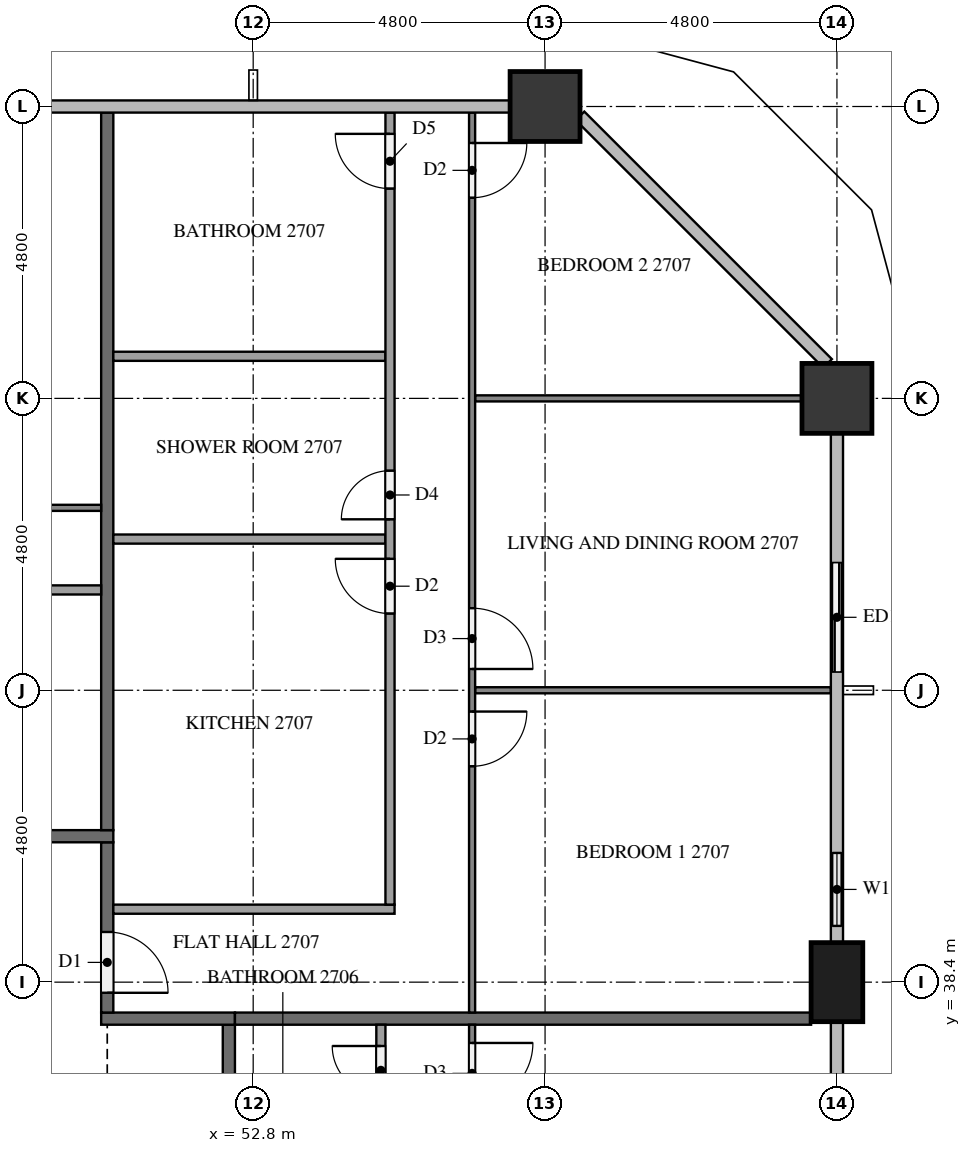
"""IFC4 building model, lengths in metres.
Left out: names, types, materials, properties, quantities, classifications, styles, units other than length and angle.
Written with IfcOpenShell. Run it as: python <this file> out.ifc"""

import sys

from ifc_helpers import new_model, si_unit, direction, frame, frame_2d, origin, origin_2d, place, context, subcontext, project, spatial, rectangle, extrude, element, fill, save


model = new_model("IFC4")
c1 = context("Model", 3, precision=1e-05, world=origin(), true_north=direction((0.0, 1.0)))
c2 = subcontext(c1, "Body", "Model", "MODEL_VIEW")
j1 = project(units=[si_unit("LENGTHUNIT", "METRE"), si_unit("PLANEANGLEUNIT", "RADIAN")], contexts=[c1])
p1 = place(None, origin())
s1 = spatial("IfcSite", under=j1, at=p1, CompositionType="ELEMENT")
p2 = place(p1, origin())
s2 = spatial("IfcBuilding", under=s1, at=p2, CompositionType="ELEMENT")
p3 = place(p2, frame((0.0, 0.0, 106.7)))
s3 = spatial("IfcBuildingStorey", under=s2, at=p3, CompositionType="ELEMENT", Elevation=106.7)
p4 = place(p3, frame((62.4, 38.4, 0.0), z_axis=(0.0, 0.0, 1.0), x_axis=(0.0, 1.0, 0.0)))
e1 = element("IfcColumn", 1, at=p4, inside=s3, PredefinedType="COLUMN", context=c2, shape_type="SweptSolid", body=[
    extrude(rectangle(XDim=1.3, YDim=0.85, at=origin_2d()), origin(), (0.0, 0.0, 1.0), 3.2),
])
for number, where, z_axis, x_axis in (
    (2, (62.4, 48.0, 0.0), (0.0, 0.0, 1.0), (1.0, 0.0, 0.0)),
    (3, (57.6, 52.8, 0.0), (0.0, 0.0, 1.0), (1.0, 0.0, 0.0)),
):
    element("IfcColumn", number, at=place(p3, frame(where, z_axis=z_axis, x_axis=x_axis)), inside=s3, PredefinedType="COLUMN", context=c2, shape_type="SweptSolid", body=[
        extrude(rectangle(XDim=1.15, YDim=1.15, at=origin_2d()), origin(), (0.0, 0.0, 1.0), 3.2),
    ])
p5 = place(p3, frame((62.4, 39.05, 0.0), z_axis=(0.0, 0.0, 1.0), x_axis=(0.0, 1.0, 0.0)))
e4 = element("IfcWall", 4, at=p5, inside=s3, PredefinedType="SOLIDWALL", context=c2, shape_type="SweptSolid", body=[
    extrude(rectangle(XDim=1.75, YDim=0.15, at=frame_2d((0.875, 0.0))), origin(), (0.0, 0.0, 1.0), 3.2),
])
p6 = place(p5, frame((0.275, 0.0, 0.9)))
e5 = element("IfcOpeningElement", 5, at=p6, cuts=e4, PredefinedType="OPENING", context=c2, shape_type="SweptSolid", body=[
    extrude(rectangle(XDim=1.2, YDim=1.4, at=frame_2d((0.6, 0.7))), frame((0.0, 0.085, 0.0), z_axis=(0.0, -1.0, 0.0), x_axis=(1.0, 0.0, 0.0)), (0.0, 0.0, 1.0), 0.17),
])
p7 = place(p3, frame((62.4, 43.2, 0.0), z_axis=(0.0, 0.0, 1.0), x_axis=(0.0, 1.0, 0.0)))
e6 = element("IfcWall", 6, at=p7, inside=s3, PredefinedType="SOLIDWALL", context=c2, shape_type="SweptSolid", body=[
    extrude(rectangle(XDim=2.4, YDim=0.15, at=frame_2d((1.2, 0.0))), origin(), (0.0, 0.0, 1.0), 3.2),
])
p8 = place(p7, frame((0.3, 0.0, 0.0)))
e7 = element("IfcOpeningElement", 7, at=p8, cuts=e6, PredefinedType="OPENING", context=c2, shape_type="SweptSolid", body=[
    extrude(rectangle(XDim=1.8, YDim=2.4, at=frame_2d((0.9, 1.2))), frame((0.0, 0.085, 0.0), z_axis=(0.0, -1.0, 0.0), x_axis=(1.0, 0.0, 0.0)), (0.0, 0.0, 1.0), 0.17),
])
p9 = place(p3, frame((52.4, 37.7, 0.0), z_axis=(0.0, 0.0, 1.0), x_axis=(0.0, -1.0, 0.0)))
e8 = element("IfcWall", 8, at=p9, inside=s3, PredefinedType="PARTITIONING", context=c2, shape_type="SweptSolid", body=[
    extrude(rectangle(XDim=22.6, YDim=0.2, at=frame_2d((11.3, 0.0))), origin(), (0.0, 0.0, 1.0), 3.2),
])
p10 = place(p9, frame((6.925, 0.0, 0.0)))
e9 = element("IfcOpeningElement", 9, at=p10, cuts=e8, PredefinedType="OPENING", context=c2, shape_type="SweptSolid", body=[
    extrude(rectangle(XDim=1.0, YDim=2.1, at=frame_2d((0.5, 1.05))), frame((0.0, 0.11, 0.0), z_axis=(0.0, -1.0, 0.0), x_axis=(1.0, 0.0, 0.0)), (0.0, 0.0, 1.0), 0.22),
])
p11 = place(p9, frame((5.075, 0.0, 0.0)))
e10 = element("IfcOpeningElement", 10, at=p11, cuts=e8, PredefinedType="OPENING", context=c2, shape_type="SweptSolid", body=[
    extrude(rectangle(XDim=1.0, YDim=2.1, at=frame_2d((0.5, 1.05))), frame((0.0, 0.11, 0.0), z_axis=(0.0, -1.0, 0.0), x_axis=(1.0, 0.0, 0.0)), (0.0, 0.0, 1.0), 0.22),
])
p12 = place(p3, frame((52.5, 37.8, 0.0), z_axis=(0.0, 0.0, 1.0), x_axis=(-1.0, 0.0, 0.0)))
e11 = element("IfcWall", 11, at=p12, inside=s3, PredefinedType="PARTITIONING", context=c2, shape_type="SweptSolid", body=[
    extrude(rectangle(XDim=2.2, YDim=0.2, at=frame_2d((1.1, 0.0))), origin(), (0.0, 0.0, 1.0), 3.2),
])
p13 = place(p3, frame((50.4, 40.7, 0.0), z_axis=(0.0, 0.0, 1.0), x_axis=(0.0, -1.0, 0.0)))
e12 = element("IfcWall", 12, at=p13, inside=s3, PredefinedType="PARTITIONING", context=c2, shape_type="SweptSolid", body=[
    extrude(rectangle(XDim=2.8, YDim=0.2, at=frame_2d((1.4, 0.0))), origin(), (0.0, 0.0, 1.0), 3.2),
])
p14 = place(p13, frame((1.475, 0.0, 0.0)))
e13 = element("IfcOpeningElement", 13, at=p14, cuts=e12, PredefinedType="OPENING", context=c2, shape_type="SweptSolid", body=[
    extrude(rectangle(XDim=1.0, YDim=2.1, at=frame_2d((0.5, 1.05))), frame((0.0, 0.11, 0.0), z_axis=(0.0, -1.0, 0.0), x_axis=(1.0, 0.0, 0.0)), (0.0, 0.0, 1.0), 0.22),
])
p15 = place(p3, frame((11.9, 40.8, 0.0), z_axis=(0.0, 0.0, 1.0), x_axis=(1.0, 0.0, 0.0)))
e14 = element("IfcWall", 14, at=p15, inside=s3, PredefinedType="PARTITIONING", context=c2, shape_type="SweptSolid", body=[
    extrude(rectangle(XDim=38.6, YDim=0.2, at=frame_2d((19.3, 0.0))), origin(), (0.0, 0.0, 1.0), 3.2),
])
p16 = place(p15, frame((22.125, 0.0, 0.0)))
e15 = element("IfcOpeningElement", 15, at=p16, cuts=e14, PredefinedType="OPENING", context=c2, shape_type="SweptSolid", body=[
    extrude(rectangle(XDim=1.0, YDim=2.1, at=frame_2d((0.5, 1.05))), frame((0.0, 0.11, 0.0), z_axis=(0.0, -1.0, 0.0), x_axis=(1.0, 0.0, 0.0)), (0.0, 0.0, 1.0), 0.22),
])
p17 = place(p15, frame((20.275, 0.0, 0.0)))
e16 = element("IfcOpeningElement", 16, at=p17, cuts=e14, PredefinedType="OPENING", context=c2, shape_type="SweptSolid", body=[
    extrude(rectangle(XDim=1.0, YDim=2.1, at=frame_2d((0.5, 1.05))), frame((0.0, 0.11, 0.0), z_axis=(0.0, -1.0, 0.0), x_axis=(1.0, 0.0, 0.0)), (0.0, 0.0, 1.0), 0.22),
])
p18 = place(p15, frame((0.525, 0.0, 0.0)))
e17 = element("IfcOpeningElement", 17, at=p18, cuts=e14, PredefinedType="OPENING", context=c2, shape_type="SweptSolid", body=[
    extrude(rectangle(XDim=1.0, YDim=2.1, at=frame_2d((0.5, 1.05))), frame((0.0, 0.11, 0.0), z_axis=(0.0, -1.0, 0.0), x_axis=(1.0, 0.0, 0.0)), (0.0, 0.0, 1.0), 0.22),
])
p19 = place(p3, frame((52.5, 37.8, 0.0), z_axis=(0.0, 0.0, 1.0), x_axis=(1.0, 0.0, 0.0)))
e18 = element("IfcWall", 18, at=p19, inside=s3, PredefinedType="PARTITIONING", context=c2, shape_type="SweptSolid", body=[
    extrude(rectangle(XDim=9.475, YDim=0.2, at=frame_2d((4.738, 0.0))), origin(), (0.0, 0.0, 1.0), 3.2),
])
p20 = place(p3, frame((50.4, 40.9, 0.0), z_axis=(0.0, 0.0, 1.0), x_axis=(0.0, 1.0, 0.0)))
e19 = element("IfcWall", 19, at=p20, inside=s3, PredefinedType="PARTITIONING", context=c2, shape_type="SweptSolid", body=[
    extrude(rectangle(XDim=11.8, YDim=0.2, at=frame_2d((5.9, 0.0))), origin(), (0.0, 0.0, 1.0), 3.2),
])
p21 = place(p3, frame((56.4, 37.7, 0.0), z_axis=(0.0, 0.0, 1.0), x_axis=(0.0, -1.0, 0.0)))
e20 = element("IfcWall", 20, at=p21, inside=s3, PredefinedType="PARTITIONING", context=c2, shape_type="SweptSolid", body=[
    extrude(rectangle(XDim=6.4, YDim=0.1, at=frame_2d((3.2, 0.0))), origin(), (0.0, 0.0, 1.0), 3.2),
])
p22 = place(p21, frame((0.3, 0.0, 0.0)))
e21 = element("IfcOpeningElement", 21, at=p22, cuts=e20, PredefinedType="OPENING", context=c2, shape_type="SweptSolid", body=[
    extrude(rectangle(XDim=1.0, YDim=2.1, at=frame_2d((0.5, 1.05))), frame((0.0, 0.06, 0.0), z_axis=(0.0, -1.0, 0.0), x_axis=(1.0, 0.0, 0.0)), (0.0, 0.0, 1.0), 0.12),
])
p23 = place(p3, frame((54.9, 33.075, 0.0), z_axis=(0.0, 0.0, 1.0), x_axis=(0.0, 1.0, 0.0)))
e22 = element("IfcWall", 22, at=p23, inside=s3, PredefinedType="PARTITIONING", context=c2, shape_type="SweptSolid", body=[
    extrude(rectangle(XDim=4.625, YDim=0.15, at=frame_2d((2.312, 0.0))), origin(), (0.0, 0.0, 1.0), 3.2),
])
p24 = place(p23, frame((0.3, 0.0, 0.0)))
e23 = element("IfcOpeningElement", 23, at=p24, cuts=e22, PredefinedType="OPENING", context=c2, shape_type="SweptSolid", body=[
    extrude(rectangle(XDim=0.9, YDim=2.1, at=frame_2d((0.45, 1.05))), frame((0.0, 0.085, 0.0), z_axis=(0.0, -1.0, 0.0), x_axis=(1.0, 0.0, 0.0)), (0.0, 0.0, 1.0), 0.17),
])
p25 = place(p23, frame((3.475, 0.0, 0.0)))
e24 = element("IfcOpeningElement", 24, at=p25, cuts=e22, PredefinedType="OPENING", context=c2, shape_type="SweptSolid", body=[
    extrude(rectangle(XDim=0.8, YDim=2.1, at=frame_2d((0.4, 1.05))), frame((0.0, 0.085, 0.0), z_axis=(0.0, -1.0, 0.0), x_axis=(1.0, 0.0, 0.0)), (0.0, 0.0, 1.0), 0.17),
])
p26 = place(p3, frame((56.45, 43.2, 0.0), z_axis=(0.0, 0.0, 1.0), x_axis=(1.0, 0.0, 0.0)))
e25 = element("IfcWall", 25, at=p26, inside=s3, PredefinedType="PARTITIONING", context=c2, shape_type="SweptSolid", body=[
    extrude(rectangle(XDim=5.85, YDim=0.1, at=frame_2d((2.925, 0.0))), origin(), (0.0, 0.0, 1.0), 3.2),
])
p27 = place(p3, frame((56.45, 48.0, 0.0), z_axis=(0.0, 0.0, 1.0), x_axis=(1.0, 0.0, 0.0)))
e26 = element("IfcWall", 26, at=p27, inside=s3, PredefinedType="PARTITIONING", context=c2, shape_type="SweptSolid", body=[
    extrude(rectangle(XDim=5.375, YDim=0.1, at=frame_2d((2.688, 0.0))), origin(), (0.0, 0.0, 1.0), 3.2),
])
p28 = place(p3, frame((56.4, 52.7, 0.0), z_axis=(0.0, 0.0, 1.0), x_axis=(0.0, -1.0, 0.0)))
e27 = element("IfcWall", 27, at=p28, inside=s3, PredefinedType="PARTITIONING", context=c2, shape_type="SweptSolid", body=[
    extrude(rectangle(XDim=14.8, YDim=0.1, at=frame_2d((7.4, 0.0))), origin(), (0.0, 0.0, 1.0), 3.2),
])
p29 = place(p28, frame((9.85, 0.0, 0.0)))
e28 = element("IfcOpeningElement", 28, at=p29, cuts=e27, PredefinedType="OPENING", context=c2, shape_type="SweptSolid", body=[
    extrude(rectangle(XDim=0.9, YDim=2.1, at=frame_2d((0.45, 1.05))), frame((0.0, 0.06, 0.0), z_axis=(0.0, -1.0, 0.0), x_axis=(1.0, 0.0, 0.0)), (0.0, 0.0, 1.0), 0.12),
])
p30 = place(p28, frame((8.15, 0.0, 0.0)))
e29 = element("IfcOpeningElement", 29, at=p30, cuts=e27, PredefinedType="OPENING", context=c2, shape_type="SweptSolid", body=[
    extrude(rectangle(XDim=1.0, YDim=2.1, at=frame_2d((0.5, 1.05))), frame((0.0, 0.06, 0.0), z_axis=(0.0, -1.0, 0.0), x_axis=(1.0, 0.0, 0.0)), (0.0, 0.0, 1.0), 0.12),
])
p31 = place(p28, frame((0.5, 0.0, 0.0)))
e30 = element("IfcOpeningElement", 30, at=p31, cuts=e27, PredefinedType="OPENING", context=c2, shape_type="SweptSolid", body=[
    extrude(rectangle(XDim=0.9, YDim=2.1, at=frame_2d((0.45, 1.05))), frame((0.0, 0.06, 0.0), z_axis=(0.0, -1.0, 0.0), x_axis=(1.0, 0.0, 0.0)), (0.0, 0.0, 1.0), 0.12),
])
for number, where, z_axis, x_axis in (
    (31, (50.5, 45.687, 0.0), (0.0, 0.0, 1.0), (1.0, 0.0, 0.0)),
    (32, (50.5, 48.692, 0.0), (0.0, 0.0, 1.0), (1.0, 0.0, 0.0)),
):
    element("IfcWall", number, at=place(p3, frame(where, z_axis=z_axis, x_axis=x_axis)), inside=s3, PredefinedType="PARTITIONING", context=c2, shape_type="SweptSolid", body=[
        extrude(rectangle(XDim=4.475, YDim=0.15, at=frame_2d((2.238, 0.0))), origin(), (0.0, 0.0, 1.0), 3.2),
    ])
p32 = place(p3, frame((50.5, 39.6, 0.0), z_axis=(0.0, 0.0, 1.0), x_axis=(1.0, 0.0, 0.0)))
e33 = element("IfcWall", 33, at=p32, inside=s3, PredefinedType="PARTITIONING", context=c2, shape_type="SweptSolid", body=[
    extrude(rectangle(XDim=4.625, YDim=0.15, at=frame_2d((2.312, 0.0))), origin(), (0.0, 0.0, 1.0), 3.2),
])
p33 = place(p3, frame((55.05, 39.675, 0.0), z_axis=(0.0, 0.0, 1.0), x_axis=(0.0, 1.0, 0.0)))
e34 = element("IfcWall", 34, at=p33, inside=s3, PredefinedType="PARTITIONING", context=c2, shape_type="SweptSolid", body=[
    extrude(rectangle(XDim=13.025, YDim=0.15, at=frame_2d((6.512, 0.0))), origin(), (0.0, 0.0, 1.0), 3.2),
])
p34 = place(p33, frame((4.787, 0.0, 0.0)))
e35 = element("IfcOpeningElement", 35, at=p34, cuts=e34, PredefinedType="OPENING", context=c2, shape_type="SweptSolid", body=[
    extrude(rectangle(XDim=0.9, YDim=2.1, at=frame_2d((0.45, 1.05))), frame((0.0, 0.085, 0.0), z_axis=(0.0, -1.0, 0.0), x_axis=(1.0, 0.0, 0.0)), (0.0, 0.0, 1.0), 0.17),
])
p35 = place(p33, frame((6.336, 0.0, 0.0)))
e36 = element("IfcOpeningElement", 36, at=p35, cuts=e34, PredefinedType="OPENING", context=c2, shape_type="SweptSolid", body=[
    extrude(rectangle(XDim=0.8, YDim=2.1, at=frame_2d((0.4, 1.05))), frame((0.0, 0.085, 0.0), z_axis=(0.0, -1.0, 0.0), x_axis=(1.0, 0.0, 0.0)), (0.0, 0.0, 1.0), 0.17),
])
p36 = place(p33, frame((11.775, 0.0, 0.0)))
e37 = element("IfcOpeningElement", 37, at=p36, cuts=e34, PredefinedType="OPENING", context=c2, shape_type="SweptSolid", body=[
    extrude(rectangle(XDim=0.9, YDim=2.1, at=frame_2d((0.45, 1.05))), frame((0.0, 0.085, 0.0), z_axis=(0.0, -1.0, 0.0), x_axis=(1.0, 0.0, 0.0)), (0.0, 0.0, 1.0), 0.17),
])
p37 = place(p3, frame((33.7, 46.2, 0.0), z_axis=(0.0, 0.0, 1.0), x_axis=(1.0, 0.0, 0.0)))
e38 = element("IfcWall", 38, at=p37, inside=s3, PredefinedType="PARTITIONING", context=c2, shape_type="SweptSolid", body=[
    extrude(rectangle(XDim=16.6, YDim=0.1, at=frame_2d((8.3, 0.0))), origin(), (0.0, 0.0, 1.0), 3.2),
])
p38 = place(p37, frame((0.3, 0.0, 0.0)))
e39 = element("IfcOpeningElement", 39, at=p38, cuts=e38, PredefinedType="OPENING", context=c2, shape_type="SweptSolid", body=[
    extrude(rectangle(XDim=0.9, YDim=2.1, at=frame_2d((0.45, 1.05))), frame((0.0, 0.06, 0.0), z_axis=(0.0, -1.0, 0.0), x_axis=(1.0, 0.0, 0.0)), (0.0, 0.0, 1.0), 0.12),
])
p39 = place(p37, frame((10.55, 0.0, 0.0)))
e40 = element("IfcOpeningElement", 40, at=p39, cuts=e38, PredefinedType="OPENING", context=c2, shape_type="SweptSolid", body=[
    extrude(rectangle(XDim=1.0, YDim=2.1, at=frame_2d((0.5, 1.05))), frame((0.0, 0.06, 0.0), z_axis=(0.0, -1.0, 0.0), x_axis=(1.0, 0.0, 0.0)), (0.0, 0.0, 1.0), 0.12),
])
p40 = place(p37, frame((12.25, 0.0, 0.0)))
e41 = element("IfcOpeningElement", 41, at=p40, cuts=e38, PredefinedType="OPENING", context=c2, shape_type="SweptSolid", body=[
    extrude(rectangle(XDim=0.9, YDim=2.1, at=frame_2d((0.45, 1.05))), frame((0.0, 0.06, 0.0), z_axis=(0.0, -1.0, 0.0), x_axis=(1.0, 0.0, 0.0)), (0.0, 0.0, 1.0), 0.12),
])
p41 = place(p3, frame((50.3, 44.85, 0.0), z_axis=(0.0, 0.0, 1.0), x_axis=(-1.0, 0.0, 0.0)))
e42 = element("IfcWall", 42, at=p41, inside=s3, PredefinedType="PARTITIONING", context=c2, shape_type="SweptSolid", body=[
    extrude(rectangle(XDim=14.825, YDim=0.15, at=frame_2d((7.413, 0.0))), origin(), (0.0, 0.0, 1.0), 3.2),
])
p42 = place(p41, frame((13.625, 0.0, 0.0)))
e43 = element("IfcOpeningElement", 43, at=p42, cuts=e42, PredefinedType="OPENING", context=c2, shape_type="SweptSolid", body=[
    extrude(rectangle(XDim=0.9, YDim=2.1, at=frame_2d((0.45, 1.05))), frame((0.0, 0.085, 0.0), z_axis=(0.0, -1.0, 0.0), x_axis=(1.0, 0.0, 0.0)), (0.0, 0.0, 1.0), 0.17),
])
p43 = place(p41, frame((4.886, 0.0, 0.0)))
e44 = element("IfcOpeningElement", 44, at=p43, cuts=e42, PredefinedType="OPENING", context=c2, shape_type="SweptSolid", body=[
    extrude(rectangle(XDim=0.8, YDim=2.1, at=frame_2d((0.4, 1.05))), frame((0.0, 0.085, 0.0), z_axis=(0.0, -1.0, 0.0), x_axis=(1.0, 0.0, 0.0)), (0.0, 0.0, 1.0), 0.17),
])
p44 = place(p41, frame((3.336, 0.0, 0.0)))
e45 = element("IfcOpeningElement", 45, at=p44, cuts=e42, PredefinedType="OPENING", context=c2, shape_type="SweptSolid", body=[
    extrude(rectangle(XDim=0.9, YDim=2.1, at=frame_2d((0.45, 1.05))), frame((0.0, 0.085, 0.0), z_axis=(0.0, -1.0, 0.0), x_axis=(1.0, 0.0, 0.0)), (0.0, 0.0, 1.0), 0.17),
])
p45 = place(p6, origin())
e46 = element("IfcWindow", 46, at=p45, inside=s3, PartitioningType="SINGLE_PANEL", PredefinedType="WINDOW", context=c2, shape_type="SweptSolid", body=[
    extrude(rectangle(XDim=1.2, YDim=1.4, at=frame_2d((0.6, 0.7))), frame((0.0, 0.03, 0.0), z_axis=(0.0, -1.0, 0.0), x_axis=(1.0, 0.0, 0.0)), (0.0, 0.0, 1.0), 0.06),
])
fill(e5, e46)
p46 = place(p8, origin())
e47 = element("IfcDoor", 47, at=p46, inside=s3, OperationType="SLIDING_TO_LEFT", PredefinedType="DOOR", context=c2, shape_type="SweptSolid", body=[
    extrude(rectangle(XDim=1.8, YDim=2.4, at=frame_2d((0.9, 1.2))), frame((0.0, 0.025, 0.0), z_axis=(0.0, -1.0, 0.0), x_axis=(1.0, 0.0, 0.0)), (0.0, 0.0, 1.0), 0.05),
])
fill(e7, e47)
p47 = place(p14, origin())
e48 = element("IfcDoor", 48, at=p47, inside=s3, OperationType="SINGLE_SWING_RIGHT", PredefinedType="DOOR", context=c2, shape_type="SweptSolid", body=[
    extrude(rectangle(XDim=1.0, YDim=2.1, at=frame_2d((0.5, 1.05))), frame((0.0, 0.025, 0.0), z_axis=(0.0, -1.0, 0.0), x_axis=(1.0, 0.0, 0.0)), (0.0, 0.0, 1.0), 0.05),
])
fill(e13, e48)
p48 = place(p22, origin())
e49 = element("IfcDoor", 49, at=p48, inside=s3, OperationType="SINGLE_SWING_LEFT", PredefinedType="DOOR", context=c2, shape_type="SweptSolid", body=[
    extrude(rectangle(XDim=1.0, YDim=2.1, at=frame_2d((0.5, 1.05))), frame((0.0, 0.025, 0.0), z_axis=(0.0, -1.0, 0.0), x_axis=(1.0, 0.0, 0.0)), (0.0, 0.0, 1.0), 0.05),
])
fill(e21, e49)
p49 = place(p25, origin())
e50 = element("IfcDoor", 50, at=p49, inside=s3, OperationType="SINGLE_SWING_RIGHT", PredefinedType="DOOR", context=c2, shape_type="SweptSolid", body=[
    extrude(rectangle(XDim=0.8, YDim=2.1, at=frame_2d((0.4, 1.05))), frame((0.0, 0.025, 0.0), z_axis=(0.0, -1.0, 0.0), x_axis=(1.0, 0.0, 0.0)), (0.0, 0.0, 1.0), 0.05),
])
fill(e24, e50)
p50 = place(p29, origin())
e51 = element("IfcDoor", 51, at=p50, inside=s3, OperationType="SINGLE_SWING_LEFT", PredefinedType="DOOR", context=c2, shape_type="SweptSolid", body=[
    extrude(rectangle(XDim=0.9, YDim=2.1, at=frame_2d((0.45, 1.05))), frame((0.0, 0.025, 0.0), z_axis=(0.0, -1.0, 0.0), x_axis=(1.0, 0.0, 0.0)), (0.0, 0.0, 1.0), 0.05),
])
fill(e28, e51)
p51 = place(p30, origin())
e52 = element("IfcDoor", 52, at=p51, inside=s3, OperationType="SINGLE_SWING_RIGHT", PredefinedType="DOOR", context=c2, shape_type="SweptSolid", body=[
    extrude(rectangle(XDim=1.0, YDim=2.1, at=frame_2d((0.5, 1.05))), frame((0.0, 0.025, 0.0), z_axis=(0.0, -1.0, 0.0), x_axis=(1.0, 0.0, 0.0)), (0.0, 0.0, 1.0), 0.05),
])
fill(e29, e52)
p52 = place(p31, origin())
e53 = element("IfcDoor", 53, at=p52, inside=s3, OperationType="SINGLE_SWING_LEFT", PredefinedType="DOOR", context=c2, shape_type="SweptSolid", body=[
    extrude(rectangle(XDim=0.9, YDim=2.1, at=frame_2d((0.45, 1.05))), frame((0.0, 0.025, 0.0), z_axis=(0.0, -1.0, 0.0), x_axis=(1.0, 0.0, 0.0)), (0.0, 0.0, 1.0), 0.05),
])
fill(e30, e53)
p53 = place(p34, origin())
e54 = element("IfcDoor", 54, at=p53, inside=s3, OperationType="SINGLE_SWING_RIGHT", PredefinedType="DOOR", context=c2, shape_type="SweptSolid", body=[
    extrude(rectangle(XDim=0.9, YDim=2.1, at=frame_2d((0.45, 1.05))), frame((0.0, 0.025, 0.0), z_axis=(0.0, -1.0, 0.0), x_axis=(1.0, 0.0, 0.0)), (0.0, 0.0, 1.0), 0.05),
])
fill(e35, e54)
p54 = place(p35, origin())
e55 = element("IfcDoor", 55, at=p54, inside=s3, OperationType="SINGLE_SWING_LEFT", PredefinedType="DOOR", context=c2, shape_type="SweptSolid", body=[
    extrude(rectangle(XDim=0.8, YDim=2.1, at=frame_2d((0.4, 1.05))), frame((0.0, 0.025, 0.0), z_axis=(0.0, -1.0, 0.0), x_axis=(1.0, 0.0, 0.0)), (0.0, 0.0, 1.0), 0.05),
])
fill(e36, e55)
p55 = place(p36, origin())
e56 = element("IfcDoor", 56, at=p55, inside=s3, OperationType="SINGLE_SWING_RIGHT", PredefinedType="DOOR", context=c2, shape_type="SweptSolid", body=[
    extrude(rectangle(XDim=0.9, YDim=2.1, at=frame_2d((0.45, 1.05))), frame((0.0, 0.025, 0.0), z_axis=(0.0, -1.0, 0.0), x_axis=(1.0, 0.0, 0.0)), (0.0, 0.0, 1.0), 0.05),
])
fill(e37, e56)
save(model, sys.argv[1])
